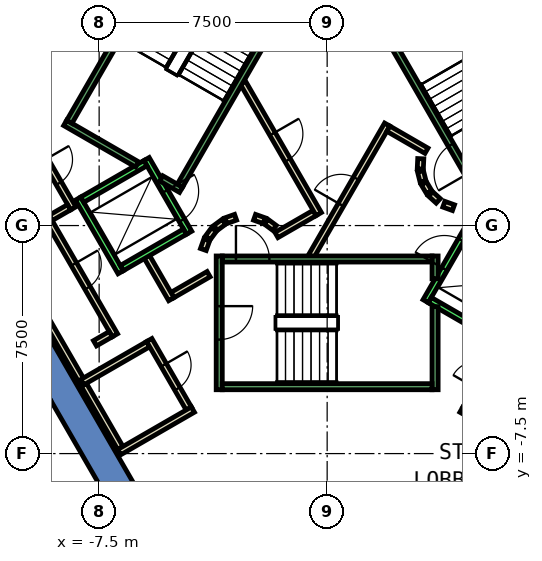
"""IFC4 building model, lengths in metres.
Left out: names, types, materials, properties, quantities, classifications, styles, units other than length and angle.
Written with IfcOpenShell. Run it as: python <this file> out.ifc"""

import sys

from ifc_helpers import new_model, si_unit, direction, frame, frame_2d, origin, place, context, subcontext, project, spatial, polyline, rectangle, outline, extrude, element, fill, save


model = new_model("IFC4")
c1 = context("Model", 3, precision=1e-05, world=origin(), true_north=direction((0.0, 1.0)))
c2 = subcontext(c1, "Body", "Model", "MODEL_VIEW")
j1 = project(units=[si_unit("LENGTHUNIT", "METRE"), si_unit("PLANEANGLEUNIT", "RADIAN")], contexts=[c1])
p1 = place(None, origin())
s1 = spatial("IfcSite", under=j1, at=p1, CompositionType="ELEMENT")
p2 = place(p1, origin())
s2 = spatial("IfcBuilding", under=s1, at=p2, CompositionType="ELEMENT")
p3 = place(p2, frame((0.0, 0.0, -16.5)))
s3 = spatial("IfcBuildingStorey", under=s2, at=p3, CompositionType="ELEMENT", Elevation=-16.5)
p4 = place(p3, origin())
e1 = element("IfcWall", 1, at=p4, inside=s3, PredefinedType="SHEAR", context=c2, shape_type="SweptSolid", body=[
    extrude(outline(polyline([(-12.267, 5.252), (-11.402, 4.752), (-6.351, 13.5), (-6.928, 14.5), (-12.267, 5.252)])), origin(), (0.0, 0.0, 1.0), 5.08),
])
p5 = place(p3, origin())
e2 = element("IfcWall", 2, at=p5, inside=s3, PredefinedType="SHEAR", context=c2, shape_type="SweptSolid", body=[
    extrude(outline(polyline([(-13.856, 2.5), (-6.928, -9.5), (-6.351, -8.5), (-12.702, 2.5), (-13.856, 2.5)])), origin(), (0.0, 0.0, 1.0), 5.08),
])
p6 = place(p3, frame((-8.033, -11.587, 0.0), z_axis=(0.0, 0.0, 1.0), x_axis=(-0.499974742752, 0.866039985572, 0.0)))
e3 = element("IfcWall", 3, at=p6, inside=s3, PredefinedType="PARTITIONING", context=c2, shape_type="SweptSolid", body=[
    extrude(rectangle(XDim=5.668, YDim=0.2, at=frame_2d((2.834, 0.0))), origin(), (0.0, 0.0, 1.0), 5.08),
])
p7 = place(p6, frame((1.788, 0.0, 0.0)))
e4 = element("IfcOpeningElement", 4, at=p7, cuts=e3, PredefinedType="OPENING", context=c2, shape_type="SweptSolid", body=[
    extrude(rectangle(XDim=1.0, YDim=2.1, at=frame_2d((0.5, 1.05))), frame((0.0, 0.11, 0.0), z_axis=(0.0, -1.0, 0.0), x_axis=(1.0, 0.0, 0.0)), (0.0, 0.0, 1.0), 0.22),
])
p8 = place(p3, frame((6.84, -7.453, 0.0), z_axis=(0.0, 0.0, 1.0), x_axis=(-0.866056369097, 0.49994636267, 0.0)))
e5 = element("IfcWall", 5, at=p8, inside=s3, PredefinedType="PARTITIONING", context=c2, shape_type="SweptSolid", body=[
    extrude(rectangle(XDim=2.8, YDim=0.2, at=frame_2d((1.4, 0.0))), origin(), (0.0, 0.0, 1.0), 5.08),
])
p9 = place(p3, frame((-9.651, 2.817, 0.0), z_axis=(0.0, 0.0, 1.0), x_axis=(0.49989585183, -0.866085525409, 0.0)))
e6 = element("IfcWall", 6, at=p9, inside=s3, PredefinedType="PARTITIONING", context=c2, shape_type="SweptSolid", body=[
    extrude(rectangle(XDim=2.6, YDim=0.2, at=frame_2d((1.3, 0.0))), origin(), (0.0, 0.0, 1.0), 5.08),
])
p10 = place(p9, frame((0.75, 0.0, 0.0)))
e7 = element("IfcOpeningElement", 7, at=p10, cuts=e6, PredefinedType="OPENING", context=c2, shape_type="SweptSolid", body=[
    extrude(rectangle(XDim=0.9, YDim=2.1, at=frame_2d((0.45, 1.05))), frame((0.0, 0.11, 0.0), z_axis=(0.0, -1.0, 0.0), x_axis=(1.0, 0.0, 0.0)), (0.0, 0.0, 1.0), 0.22),
])
p11 = place(p3, frame((-8.488, 0.602, 0.0), z_axis=(0.0, 0.0, 1.0), x_axis=(-0.865871789474, -0.500265973451, 0.0)))
e8 = element("IfcWall", 8, at=p11, inside=s3, PredefinedType="PARTITIONING", context=c2, shape_type="SweptSolid", body=[
    extrude(rectangle(XDim=0.7, YDim=0.2, at=frame_2d((0.35, 0.0))), origin(), (0.0, 0.0, 1.0), 5.08),
])
p12 = place(p3, frame((-9.231, 0.288, 0.0), z_axis=(0.0, 0.0, 1.0), x_axis=(0.500013631625, -0.866017533419, 0.0)))
e9 = element("IfcWall", 9, at=p12, inside=s3, PredefinedType="PARTITIONING", context=c2, shape_type="SweptSolid", body=[
    extrude(rectangle(XDim=4.5, YDim=0.2, at=frame_2d((2.25, 0.0))), origin(), (0.0, 0.0, 1.0), 5.08),
])
p13 = place(p12, frame((1.8, 0.0, 0.0)))
e10 = element("IfcOpeningElement", 10, at=p13, cuts=e9, PredefinedType="OPENING", context=c2, shape_type="SweptSolid", body=[
    extrude(rectangle(XDim=0.9, YDim=2.1, at=frame_2d((0.45, 1.05))), frame((0.0, 0.11, 0.0), z_axis=(0.0, -1.0, 0.0), x_axis=(1.0, 0.0, 0.0)), (0.0, 0.0, 1.0), 0.22),
])
p14 = place(p3, frame((-7.117, -3.572, 0.0), z_axis=(0.0, 0.0, 1.0), x_axis=(-0.866158505053, -0.499769390944, 0.0)))
e11 = element("IfcWall", 11, at=p14, inside=s3, PredefinedType="PARTITIONING", context=c2, shape_type="SweptSolid", body=[
    extrude(rectangle(XDim=0.6, YDim=0.2, at=frame_2d((0.3, 0.0))), origin(), (0.0, 0.0, 1.0), 5.08),
])
p15 = place(p3, frame((-8.003, -5.238, 0.0), z_axis=(0.0, 0.0, 1.0), x_axis=(-0.500047596559, 0.865997922154, 0.0)))
e12 = element("IfcWall", 12, at=p15, inside=s3, PredefinedType="PARTITIONING", context=c2, shape_type="SweptSolid", body=[
    extrude(rectangle(XDim=5.2, YDim=0.2, at=frame_2d((2.6, 0.0))), origin(), (0.0, 0.0, 1.0), 5.08),
])
p16 = place(p3, frame((-6.803, -7.317, 0.0), z_axis=(0.0, 0.0, 1.0), x_axis=(-0.499913221443, 0.866075499611, 0.0)))
e13 = element("IfcWall", 13, at=p16, inside=s3, PredefinedType="PARTITIONING", context=c2, shape_type="SweptSolid", body=[
    extrude(rectangle(XDim=2.4, YDim=0.2, at=frame_2d((1.2, 0.0))), origin(), (0.0, 0.0, 1.0), 5.08),
])
p17 = place(p3, frame((-8.053, -5.151, 0.0), z_axis=(0.0, 0.0, 1.0), x_axis=(0.866234368172, 0.499637888272, 0.0)))
e14 = element("IfcWall", 14, at=p17, inside=s3, PredefinedType="PARTITIONING", context=c2, shape_type="SweptSolid", body=[
    extrude(rectangle(XDim=2.499, YDim=0.2, at=frame_2d((1.25, 0.0))), origin(), (0.0, 0.0, 1.0), 5.08),
])
p18 = place(p3, frame((-5.851, -3.765, 0.0), z_axis=(0.0, 0.0, 1.0), x_axis=(0.499925626596, -0.866068339032, 0.0)))
e15 = element("IfcWall", 15, at=p18, inside=s3, PredefinedType="PARTITIONING", context=c2, shape_type="SweptSolid", body=[
    extrude(rectangle(XDim=2.601, YDim=0.2, at=frame_2d((1.3, 0.0))), origin(), (0.0, 0.0, 1.0), 5.08),
])
p19 = place(p18, frame((0.95, 0.0, 0.0)))
e16 = element("IfcOpeningElement", 16, at=p19, cuts=e15, PredefinedType="OPENING", context=c2, shape_type="SweptSolid", body=[
    extrude(rectangle(XDim=0.9, YDim=2.1, at=frame_2d((0.45, 1.05))), frame((0.0, 0.11, 0.0), z_axis=(0.0, -1.0, 0.0), x_axis=(1.0, 0.0, 0.0)), (0.0, 0.0, 1.0), 0.22),
])
p20 = place(p3, frame((-4.415, -6.053, 0.0), z_axis=(0.0, 0.0, 1.0), x_axis=(-0.866056369097, -0.49994636267, 0.0)))
e17 = element("IfcWall", 17, at=p20, inside=s3, PredefinedType="PARTITIONING", context=c2, shape_type="SweptSolid", body=[
    extrude(rectangle(XDim=2.8, YDim=0.2, at=frame_2d((1.4, 0.0))), origin(), (0.0, 0.0, 1.0), 5.08),
])
p21 = place(p3, frame((3.079, 2.199, 0.0), z_axis=(0.0, 0.0, 1.0), x_axis=(-0.047771483479, -0.998858290933, 0.0)))
e18 = element("IfcWall", 18, at=p21, inside=s3, PredefinedType="PARTITIONING", context=c2, shape_type="SweptSolid", body=[
    extrude(rectangle(XDim=0.337, YDim=0.2, at=frame_2d((0.169, 0.0))), origin(), (0.0, 0.0, 1.0), 5.08),
])
p22 = place(p3, frame((3.07, 1.786, 0.0), z_axis=(0.0, 0.0, 1.0), x_axis=(0.242705583207, -0.970099994784, 0.0)))
e19 = element("IfcWall", 19, at=p22, inside=s3, PredefinedType="PARTITIONING", context=c2, shape_type="SweptSolid", body=[
    extrude(rectangle(XDim=0.338, YDim=0.2, at=frame_2d((0.169, 0.0))), origin(), (0.0, 0.0, 1.0), 5.08),
])
for number, where, z_axis, x_axis in (
    (20, (3.182, 1.388, 0.0), (0.0, 0.0, 1.0), (0.512, -0.859, 0.0)),
    (21, (3.404, 1.039, 0.0), (0.0, 0.0, 1.0), (0.74, -0.672, 0.0)),
):
    element("IfcWall", number, at=place(p3, frame(where, z_axis=z_axis, x_axis=x_axis)), inside=s3, PredefinedType="PARTITIONING", context=c2, shape_type="SweptSolid", body=[
        extrude(rectangle(XDim=0.338, YDim=0.2, at=frame_2d((0.169, 0.0))), origin(), (0.0, 0.0, 1.0), 5.08),
    ])
p23 = place(p3, frame((3.838, 0.702, 0.0), z_axis=(0.0, 0.0, 1.0), x_axis=(0.941035081519, -0.338308993895, 0.0)))
e22 = element("IfcWall", 22, at=p23, inside=s3, PredefinedType="PARTITIONING", context=c2, shape_type="SweptSolid", body=[
    extrude(rectangle(XDim=0.337, YDim=0.2, at=frame_2d((0.168, 0.0))), origin(), (0.0, 0.0, 1.0), 5.08),
])
p24 = place(p3, frame((-0.52, -1.0, 0.0), z_axis=(0.0, 0.0, 1.0), x_axis=(0.50011622646, 0.865958290007, 0.0)))
e23 = element("IfcWall", 23, at=p24, inside=s3, PredefinedType="PARTITIONING", context=c2, shape_type="SweptSolid", body=[
    extrude(rectangle(XDim=4.991, YDim=0.2, at=frame_2d((2.496, 0.0))), origin(), (0.0, 0.0, 1.0), 5.08),
])
p25 = place(p24, frame((1.945, 0.0, 0.0)))
e24 = element("IfcOpeningElement", 24, at=p25, cuts=e23, PredefinedType="OPENING", context=c2, shape_type="SweptSolid", body=[
    extrude(rectangle(XDim=1.0, YDim=2.1, at=frame_2d((0.5, 1.05))), frame((0.0, 0.11, 0.0), z_axis=(0.0, -1.0, 0.0), x_axis=(1.0, 0.0, 0.0)), (0.0, 0.0, 1.0), 0.22),
])
p26 = place(p3, frame((2.012, 3.186, 0.0), z_axis=(0.0, 0.0, 1.0), x_axis=(0.865891012941, -0.500232699559, 0.0)))
e25 = element("IfcWall", 25, at=p26, inside=s3, PredefinedType="PARTITIONING", context=c2, shape_type="SweptSolid", body=[
    extrude(rectangle(XDim=1.449, YDim=0.2, at=frame_2d((0.725, 0.0))), origin(), (0.0, 0.0, 1.0), 5.08),
])
p27 = place(p3, frame((-0.412, 0.414, 0.0), z_axis=(0.0, 0.0, 1.0), x_axis=(-0.866017369001, -0.500013916395, 0.0)))
e26 = element("IfcWall", 26, at=p27, inside=s3, PredefinedType="PARTITIONING", context=c2, shape_type="SweptSolid", body=[
    extrude(rectangle(XDim=1.45, YDim=0.2, at=frame_2d((0.725, 0.0))), origin(), (0.0, 0.0, 1.0), 5.08),
])
p28 = place(p3, frame((-1.731, -0.077, 0.0), z_axis=(0.0, 0.0, 1.0), x_axis=(-0.804311165252, 0.594208338422, 0.0)))
e27 = element("IfcWall", 27, at=p28, inside=s3, PredefinedType="PARTITIONING", context=c2, shape_type="SweptSolid", body=[
    extrude(rectangle(XDim=0.338, YDim=0.2, at=frame_2d((0.169, 0.0))), origin(), (0.0, 0.0, 1.0), 5.08),
])
p29 = place(p3, frame((-2.07, 0.16, 0.0), z_axis=(0.0, 0.0, 1.0), x_axis=(-0.942199461132, 0.335052496547, 0.0)))
e28 = element("IfcWall", 28, at=p29, inside=s3, PredefinedType="PARTITIONING", context=c2, shape_type="SweptSolid", body=[
    extrude(rectangle(XDim=0.337, YDim=0.2, at=frame_2d((0.169, 0.0))), origin(), (0.0, 0.0, 1.0), 5.08),
])
p30 = place(p3, frame((-3.012, 0.273, 0.0), z_axis=(0.0, 0.0, 1.0), x_axis=(-0.942280615813, -0.334824194261, 0.0)))
e29 = element("IfcWall", 29, at=p30, inside=s3, PredefinedType="PARTITIONING", context=c2, shape_type="SweptSolid", body=[
    extrude(rectangle(XDim=0.338, YDim=0.2, at=frame_2d((0.169, 0.0))), origin(), (0.0, 0.0, 1.0), 5.08),
])
p31 = place(p3, frame((-3.397, 0.124, 0.0), z_axis=(0.0, 0.0, 1.0), x_axis=(-0.804311165252, -0.594208338422, 0.0)))
e30 = element("IfcWall", 30, at=p31, inside=s3, PredefinedType="PARTITIONING", context=c2, shape_type="SweptSolid", body=[
    extrude(rectangle(XDim=0.338, YDim=0.2, at=frame_2d((0.169, 0.0))), origin(), (0.0, 0.0, 1.0), 5.08),
])
p32 = place(p3, frame((-3.723, -0.131, 0.0), z_axis=(0.0, 0.0, 1.0), x_axis=(-0.594675113454, -0.803966112121, 0.0)))
e31 = element("IfcWall", 31, at=p32, inside=s3, PredefinedType="PARTITIONING", context=c2, shape_type="SweptSolid", body=[
    extrude(rectangle(XDim=0.338, YDim=0.2, at=frame_2d((0.169, 0.0))), origin(), (0.0, 0.0, 1.0), 5.08),
])
p33 = place(p3, frame((-3.96, -0.47, 0.0), z_axis=(0.0, 0.0, 1.0), x_axis=(-0.334824194261, -0.942280615813, 0.0)))
e32 = element("IfcWall", 32, at=p33, inside=s3, PredefinedType="PARTITIONING", context=c2, shape_type="SweptSolid", body=[
    extrude(rectangle(XDim=0.338, YDim=0.2, at=frame_2d((0.169, 0.0))), origin(), (0.0, 0.0, 1.0), 5.08),
])
p34 = place(p3, frame((-3.9, -1.599, 0.0), z_axis=(0.0, 0.0, 1.0), x_axis=(-0.865969445389, -0.500096910261, 0.0)))
e33 = element("IfcWall", 33, at=p34, inside=s3, PredefinedType="PARTITIONING", context=c2, shape_type="SweptSolid", body=[
    extrude(rectangle(XDim=1.373, YDim=0.2, at=frame_2d((0.687, 0.0))), origin(), (0.0, 0.0, 1.0), 5.08),
])
p35 = place(p3, frame((-5.126, -2.422, 0.0), z_axis=(0.0, 0.0, 1.0), x_axis=(-0.500062241894, 0.865989465428, 0.0)))
e34 = element("IfcWall", 34, at=p35, inside=s3, PredefinedType="PARTITIONING", context=c2, shape_type="SweptSolid", body=[
    extrude(rectangle(XDim=1.7, YDim=0.2, at=frame_2d((0.85, 0.0))), origin(), (0.0, 0.0, 1.0), 5.08),
])
p36 = place(p3, frame((-2.771, 4.7, 0.0), z_axis=(0.0, 0.0, 1.0), x_axis=(0.499969479948, -0.866043023828, 0.0)))
e35 = element("IfcWall", 35, at=p36, inside=s3, PredefinedType="PARTITIONING", context=c2, shape_type="SweptSolid", body=[
    extrude(rectangle(XDim=4.99, YDim=0.2, at=frame_2d((2.495, 0.0))), origin(), (0.0, 0.0, 1.0), 5.08),
])
p37 = place(p36, frame((1.945, 0.0, 0.0)))
e36 = element("IfcOpeningElement", 36, at=p37, cuts=e35, PredefinedType="OPENING", context=c2, shape_type="SweptSolid", body=[
    extrude(rectangle(XDim=1.0, YDim=2.1, at=frame_2d((0.5, 1.05))), frame((0.0, 0.11, 0.0), z_axis=(0.0, -1.0, 0.0), x_axis=(1.0, 0.0, 0.0)), (0.0, 0.0, 1.0), 0.22),
])
p38 = place(p3, frame((-5.94, 2.188, 0.0), z_axis=(0.0, 0.0, 1.0), x_axis=(0.49994636267, -0.866056369097, 0.0)))
e37 = element("IfcWall", 37, at=p38, inside=s3, PredefinedType="STANDARD", context=c2, shape_type="SweptSolid", body=[
    extrude(rectangle(XDim=2.8, YDim=0.2, at=frame_2d((1.4, 0.0))), origin(), (0.0, 0.0, 1.0), 5.08),
])
p39 = place(p38, frame((1.225, 0.0, 0.0)))
e38 = element("IfcOpeningElement", 38, at=p39, cuts=e37, PredefinedType="OPENING", context=c2, shape_type="SweptSolid", body=[
    extrude(rectangle(XDim=1.1, YDim=2.1, at=frame_2d((0.55, 1.05))), frame((0.0, 0.11, 0.0), z_axis=(0.0, -1.0, 0.0), x_axis=(1.0, 0.0, 0.0)), (0.0, 0.0, 1.0), 0.22),
])
p40 = place(p3, frame((-8.192, 0.888, 0.0), z_axis=(0.0, 0.0, 1.0), x_axis=(0.49994636267, -0.866056369097, 0.0)))
e39 = element("IfcWall", 39, at=p40, inside=s3, PredefinedType="STANDARD", context=c2, shape_type="SweptSolid", body=[
    extrude(rectangle(XDim=2.8, YDim=0.2, at=frame_2d((1.4, 0.0))), origin(), (0.0, 0.0, 1.0), 5.08),
])
for number, where, z_axis, x_axis in (
    (40, (-5.977, 2.052, 0.0), (0.0, 0.0, 1.0), (-0.866, -0.5, 0.0)),
    (41, (-4.677, -0.2, 0.0), (0.0, 0.0, 1.0), (-0.866, -0.5, 0.0)),
):
    element("IfcWall", number, at=place(p3, frame(where, z_axis=z_axis, x_axis=x_axis)), inside=s3, PredefinedType="STANDARD", context=c2, shape_type="SweptSolid", body=[
        extrude(rectangle(XDim=2.399, YDim=0.2, at=frame_2d((1.2, 0.0))), origin(), (0.0, 0.0, 1.0), 5.08),
    ])
p41 = place(p3, frame((3.24, -2.488, 0.0), z_axis=(0.0, 0.0, 1.0), x_axis=(0.49994636267, 0.866056369097, 0.0)))
e42 = element("IfcWall", 42, at=p41, inside=s3, PredefinedType="STANDARD", context=c2, shape_type="SweptSolid", body=[
    extrude(rectangle(XDim=2.8, YDim=0.2, at=frame_2d((1.4, 0.0))), origin(), (0.0, 0.0, 1.0), 5.08),
])
p42 = place(p41, frame((1.225, 0.0, 0.0)))
e43 = element("IfcOpeningElement", 43, at=p42, cuts=e42, PredefinedType="OPENING", context=c2, shape_type="SweptSolid", body=[
    extrude(rectangle(XDim=1.1, YDim=2.1, at=frame_2d((0.55, 1.05))), frame((0.0, 0.11, 0.0), z_axis=(0.0, -1.0, 0.0), x_axis=(1.0, 0.0, 0.0)), (0.0, 0.0, 1.0), 0.22),
])
p43 = place(p3, frame((3.377, -2.452, 0.0), z_axis=(0.0, 0.0, 1.0), x_axis=(0.865955154139, -0.50012165622, 0.0)))
e44 = element("IfcWall", 44, at=p43, inside=s3, PredefinedType="STANDARD", context=c2, shape_type="SweptSolid", body=[
    extrude(rectangle(XDim=2.4, YDim=0.2, at=frame_2d((1.2, 0.0))), origin(), (0.0, 0.0, 1.0), 5.08),
])
p44 = place(p3, frame((-3.55, -1.0, 0.0), z_axis=(0.0, 0.0, 1.0), x_axis=(0.0, -1.0, 0.0)))
e45 = element("IfcWall", 45, at=p44, inside=s3, PredefinedType="STANDARD", context=c2, shape_type="SweptSolid", body=[
    extrude(rectangle(XDim=4.4, YDim=0.2, at=frame_2d((2.2, 0.0))), origin(), (0.0, 0.0, 1.0), 5.08),
])
p45 = place(p44, frame((1.65, 0.0, 0.0)))
e46 = element("IfcOpeningElement", 46, at=p45, cuts=e45, PredefinedType="OPENING", context=c2, shape_type="SweptSolid", body=[
    extrude(rectangle(XDim=1.1, YDim=2.2, at=frame_2d((0.55, 1.1))), frame((0.0, 0.11, 0.0), z_axis=(0.0, -1.0, 0.0), x_axis=(1.0, 0.0, 0.0)), (0.0, 0.0, 1.0), 0.22),
])
p46 = place(p3, frame((3.55, -2.667, 0.0), z_axis=(0.0, 0.0, 1.0), x_axis=(0.0, -1.0, 0.0)))
e47 = element("IfcWall", 47, at=p46, inside=s3, PredefinedType="STANDARD", context=c2, shape_type="SweptSolid", body=[
    extrude(rectangle(XDim=2.733, YDim=0.2, at=frame_2d((1.366, 0.0))), origin(), (0.0, 0.0, 1.0), 5.08),
])
p47 = place(p3, frame((3.55, -1.0, 0.0), z_axis=(0.0, 0.0, 1.0), x_axis=(0.0, -1.0, 0.0)))
e48 = element("IfcWall", 48, at=p47, inside=s3, PredefinedType="STANDARD", context=c2, shape_type="SweptSolid", body=[
    extrude(rectangle(XDim=0.751, YDim=0.2, at=frame_2d((0.375, 0.0))), origin(), (0.0, 0.0, 1.0), 5.08),
])
p48 = place(p3, frame((-3.45, -1.1, 0.0), z_axis=(0.0, 0.0, 1.0), x_axis=(1.0, 0.0, 0.0)))
e49 = element("IfcWall", 49, at=p48, inside=s3, PredefinedType="STANDARD", context=c2, shape_type="SweptSolid", body=[
    extrude(rectangle(XDim=6.9, YDim=0.2, at=frame_2d((3.45, 0.0))), origin(), (0.0, 0.0, 1.0), 5.08),
])
p49 = place(p48, frame((0.45, 0.0, 0.0)))
e50 = element("IfcOpeningElement", 50, at=p49, cuts=e49, PredefinedType="OPENING", context=c2, shape_type="SweptSolid", body=[
    extrude(rectangle(XDim=1.1, YDim=2.2, at=frame_2d((0.55, 1.1))), frame((0.0, 0.11, 0.0), z_axis=(0.0, -1.0, 0.0), x_axis=(1.0, 0.0, 0.0)), (0.0, 0.0, 1.0), 0.22),
])
p50 = place(p3, frame((-3.45, -5.3, 0.0), z_axis=(0.0, 0.0, 1.0), x_axis=(1.0, 0.0, 0.0)))
e51 = element("IfcWall", 51, at=p50, inside=s3, PredefinedType="STANDARD", context=c2, shape_type="SweptSolid", body=[
    extrude(rectangle(XDim=6.9, YDim=0.2, at=frame_2d((3.45, 0.0))), origin(), (0.0, 0.0, 1.0), 5.08),
])
p51 = place(p3, frame((4.843, 1.312, 0.0), z_axis=(0.0, 0.0, 1.0), x_axis=(-0.499963383562, 0.866046543262, 0.0)))
e52 = element("IfcWall", 52, at=p51, inside=s3, PredefinedType="STANDARD", context=c2, shape_type="SweptSolid", body=[
    extrude(rectangle(XDim=6.9, YDim=0.2, at=frame_2d((3.45, 0.0))), origin(), (0.0, 0.0, 1.0), 5.08),
])
p52 = place(p51, frame((0.45, 0.0, 0.0)))
e53 = element("IfcOpeningElement", 53, at=p52, cuts=e52, PredefinedType="OPENING", context=c2, shape_type="SweptSolid", body=[
    extrude(rectangle(XDim=1.1, YDim=2.2, at=frame_2d((0.55, 1.1))), frame((0.0, 0.11, 0.0), z_axis=(0.0, -1.0, 0.0), x_axis=(1.0, 0.0, 0.0)), (0.0, 0.0, 1.0), 0.22),
])
p53 = place(p3, frame((-6.25, 2.01, 0.0), z_axis=(0.0, 0.0, 1.0), x_axis=(-0.86611865017, 0.499838457731, 0.0)))
e54 = element("IfcWall", 54, at=p53, inside=s3, PredefinedType="STANDARD", context=c2, shape_type="SweptSolid", body=[
    extrude(rectangle(XDim=2.733, YDim=0.2, at=frame_2d((1.366, 0.0))), origin(), (0.0, 0.0, 1.0), 5.08),
])
p54 = place(p3, frame((-4.806, 1.176, 0.0), z_axis=(0.0, 0.0, 1.0), x_axis=(-0.866558586415, 0.499075361355, 0.0)))
e55 = element("IfcWall", 55, at=p54, inside=s3, PredefinedType="STANDARD", context=c2, shape_type="SweptSolid", body=[
    extrude(rectangle(XDim=0.751, YDim=0.2, at=frame_2d((0.376, 0.0))), origin(), (0.0, 0.0, 1.0), 5.08),
])
p55 = place(p3, frame((-1.393, 7.288, 0.0), z_axis=(0.0, 0.0, 1.0), x_axis=(-0.499963383562, -0.866046543262, 0.0)))
e56 = element("IfcWall", 56, at=p55, inside=s3, PredefinedType="STANDARD", context=c2, shape_type="SweptSolid", body=[
    extrude(rectangle(XDim=6.9, YDim=0.2, at=frame_2d((3.45, 0.0))), origin(), (0.0, 0.0, 1.0), 5.08),
])
p56 = place(p55, frame((0.45, 0.0, 0.0)))
e57 = element("IfcOpeningElement", 57, at=p56, cuts=e56, PredefinedType="OPENING", context=c2, shape_type="SweptSolid", body=[
    extrude(rectangle(XDim=1.1, YDim=2.2, at=frame_2d((0.55, 1.1))), frame((0.0, 0.11, 0.0), z_axis=(0.0, -1.0, 0.0), x_axis=(1.0, 0.0, 0.0)), (0.0, 0.0, 1.0), 0.22),
])
p57 = place(p3, frame((-5.03, 9.388, 0.0), z_axis=(0.0, 0.0, 1.0), x_axis=(-0.499978703459, -0.866037698999, 0.0)))
e58 = element("IfcWall", 58, at=p57, inside=s3, PredefinedType="STANDARD", context=c2, shape_type="SweptSolid", body=[
    extrude(rectangle(XDim=6.9, YDim=0.2, at=frame_2d((3.45, 0.0))), origin(), (0.0, 0.0, 1.0), 5.08),
])
p58 = place(p25, origin())
e59 = element("IfcDoor", 59, at=p58, inside=s3, OperationType="SINGLE_SWING_LEFT", PredefinedType="DOOR", context=c2, shape_type="SweptSolid", body=[
    extrude(rectangle(XDim=1.0, YDim=2.1, at=frame_2d((0.5, 1.05))), frame((0.0, 0.025, 0.0), z_axis=(0.0, -1.0, 0.0), x_axis=(1.0, 0.0, 0.0)), (0.0, 0.0, 1.0), 0.05),
])
fill(e24, e59)
p59 = place(p37, origin())
e60 = element("IfcDoor", 60, at=p59, inside=s3, OperationType="SINGLE_SWING_RIGHT", PredefinedType="DOOR", context=c2, shape_type="SweptSolid", body=[
    extrude(rectangle(XDim=1.0, YDim=2.1, at=frame_2d((0.5, 1.05))), frame((0.0, 0.025, 0.0), z_axis=(0.0, -1.0, 0.0), x_axis=(1.0, 0.0, 0.0)), (0.0, 0.0, 1.0), 0.05),
])
fill(e36, e60)
p60 = place(p10, origin())
e61 = element("IfcDoor", 61, at=p60, inside=s3, OperationType="SINGLE_SWING_RIGHT", PredefinedType="DOOR", context=c2, shape_type="SweptSolid", body=[
    extrude(rectangle(XDim=0.9, YDim=2.1, at=frame_2d((0.45, 1.05))), frame((0.0, 0.025, 0.0), z_axis=(0.0, -1.0, 0.0), x_axis=(1.0, 0.0, 0.0)), (0.0, 0.0, 1.0), 0.05),
])
fill(e7, e61)
p61 = place(p13, origin())
e62 = element("IfcDoor", 62, at=p61, inside=s3, OperationType="SINGLE_SWING_LEFT", PredefinedType="DOOR", context=c2, shape_type="SweptSolid", body=[
    extrude(rectangle(XDim=0.9, YDim=2.1, at=frame_2d((0.45, 1.05))), frame((0.0, 0.025, 0.0), z_axis=(0.0, -1.0, 0.0), x_axis=(1.0, 0.0, 0.0)), (0.0, 0.0, 1.0), 0.05),
])
fill(e10, e62)
p62 = place(p19, origin())
e63 = element("IfcDoor", 63, at=p62, inside=s3, OperationType="SINGLE_SWING_LEFT", PredefinedType="DOOR", context=c2, shape_type="SweptSolid", body=[
    extrude(rectangle(XDim=0.9, YDim=2.1, at=frame_2d((0.45, 1.05))), frame((0.0, 0.025, 0.0), z_axis=(0.0, -1.0, 0.0), x_axis=(1.0, 0.0, 0.0)), (0.0, 0.0, 1.0), 0.05),
])
fill(e16, e63)
p63 = place(p42, origin())
e64 = element("IfcDoor", 64, at=p63, inside=s3, OperationType="SLIDING_TO_LEFT", PredefinedType="DOOR", context=c2, shape_type="SweptSolid", body=[
    extrude(rectangle(XDim=1.1, YDim=2.1, at=frame_2d((0.55, 1.05))), frame((0.0, 0.025, 0.0), z_axis=(0.0, -1.0, 0.0), x_axis=(1.0, 0.0, 0.0)), (0.0, 0.0, 1.0), 0.05),
])
fill(e43, e64)
p64 = place(p39, origin())
e65 = element("IfcDoor", 65, at=p64, inside=s3, OperationType="SLIDING_TO_LEFT", PredefinedType="DOOR", context=c2, shape_type="SweptSolid", body=[
    extrude(rectangle(XDim=1.1, YDim=2.1, at=frame_2d((0.55, 1.05))), frame((0.0, 0.025, 0.0), z_axis=(0.0, -1.0, 0.0), x_axis=(1.0, 0.0, 0.0)), (0.0, 0.0, 1.0), 0.05),
])
fill(e38, e65)
p65 = place(p49, origin())
e66 = element("IfcDoor", 66, at=p65, inside=s3, OperationType="SINGLE_SWING_LEFT", PredefinedType="DOOR", context=c2, shape_type="SweptSolid", body=[
    extrude(rectangle(XDim=1.1, YDim=2.2, at=frame_2d((0.55, 1.1))), frame((0.0, 0.025, 0.0), z_axis=(0.0, -1.0, 0.0), x_axis=(1.0, 0.0, 0.0)), (0.0, 0.0, 1.0), 0.05),
])
fill(e50, e66)
p66 = place(p45, origin())
e67 = element("IfcDoor", 67, at=p66, inside=s3, OperationType="SINGLE_SWING_LEFT", PredefinedType="DOOR", context=c2, shape_type="SweptSolid", body=[
    extrude(rectangle(XDim=1.1, YDim=2.2, at=frame_2d((0.55, 1.1))), frame((0.0, 0.025, 0.0), z_axis=(0.0, -1.0, 0.0), x_axis=(1.0, 0.0, 0.0)), (0.0, 0.0, 1.0), 0.05),
])
fill(e46, e67)
p67 = place(p52, origin())
e68 = element("IfcDoor", 68, at=p67, inside=s3, OperationType="SINGLE_SWING_LEFT", PredefinedType="DOOR", context=c2, shape_type="SweptSolid", body=[
    extrude(rectangle(XDim=1.1, YDim=2.2, at=frame_2d((0.55, 1.1))), frame((0.0, 0.025, 0.0), z_axis=(0.0, -1.0, 0.0), x_axis=(1.0, 0.0, 0.0)), (0.0, 0.0, 1.0), 0.05),
])
fill(e53, e68)
save(model, sys.argv[1])
